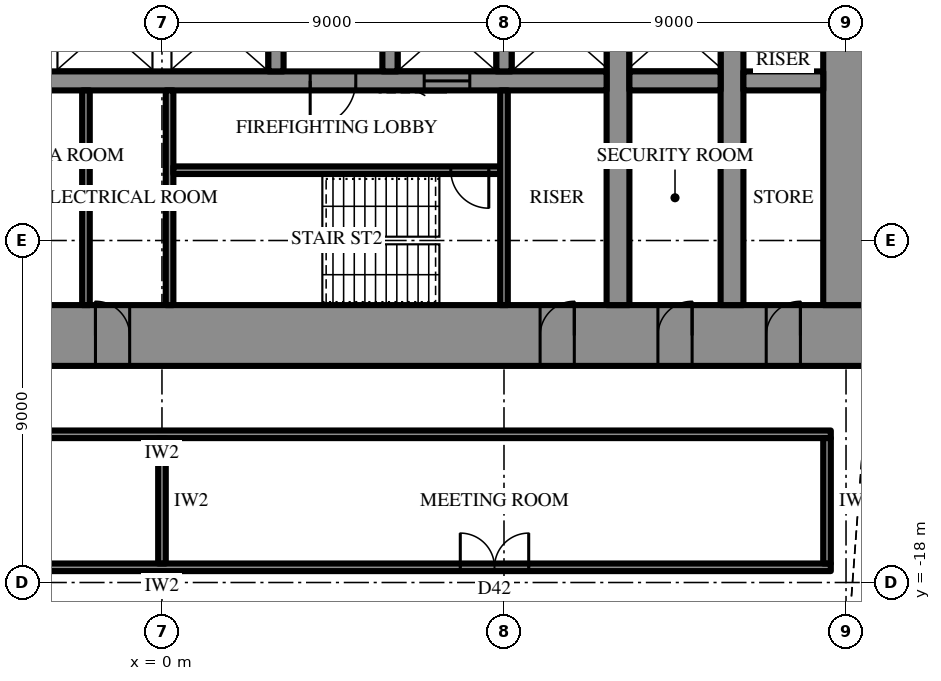
"""IFC4 building model, lengths in metres.
Left out: names, types, materials, properties, quantities, classifications, styles, units other than length and angle.
Written with IfcOpenShell. Run it as: python <this file> out.ifc"""

import sys

from ifc_helpers import new_model, si_unit, direction, frame, frame_2d, origin, place, context, subcontext, project, spatial, rectangle, extrude, element, fill, save


model = new_model("IFC4")
c1 = context("Model", 3, precision=1e-05, world=origin(), true_north=direction((0.0, 1.0)))
c2 = subcontext(c1, "Body", "Model", "MODEL_VIEW")
j1 = project(units=[si_unit("LENGTHUNIT", "METRE"), si_unit("PLANEANGLEUNIT", "RADIAN")], contexts=[c1])
p1 = place(None, origin())
s1 = spatial("IfcSite", under=j1, at=p1, CompositionType="ELEMENT")
p2 = place(p1, origin())
s2 = spatial("IfcBuilding", under=s1, at=p2, CompositionType="ELEMENT")
p3 = place(p2, frame((0.0, 0.0, 123.7)))
s3 = spatial("IfcBuildingStorey", under=s2, at=p3, CompositionType="ELEMENT", Elevation=123.7)
p4 = place(p3, frame((18.6, -11.5, 0.0), z_axis=(0.0, 0.0, 1.0), x_axis=(-1.0, 0.0, 0.0)))
e1 = element("IfcWall", 1, at=p4, inside=s3, PredefinedType="SHEAR", context=c2, shape_type="SweptSolid", body=[
    extrude(rectangle(XDim=37.2, YDim=1.6, at=frame_2d((18.6, 0.0))), origin(), (0.0, 0.0, 1.0), 4.2),
])
p5 = place(p4, frame((19.45, 0.0, 0.0)))
e2 = element("IfcOpeningElement", 2, at=p5, cuts=e1, PredefinedType="OPENING", context=c2, shape_type="SweptSolid", body=[
    extrude(rectangle(XDim=0.9, YDim=2.2, at=frame_2d((0.45, 1.1))), frame((0.0, 0.81, 0.0), z_axis=(0.0, -1.0, 0.0), x_axis=(1.0, 0.0, 0.0)), (0.0, 0.0, 1.0), 1.62),
])
p6 = place(p4, frame((22.45, 0.0, 0.0)))
e3 = element("IfcOpeningElement", 3, at=p6, cuts=e1, PredefinedType="OPENING", context=c2, shape_type="SweptSolid", body=[
    extrude(rectangle(XDim=0.9, YDim=2.2, at=frame_2d((0.45, 1.1))), frame((0.0, 0.81, 0.0), z_axis=(0.0, -1.0, 0.0), x_axis=(1.0, 0.0, 0.0)), (0.0, 0.0, 1.0), 1.62),
])
p7 = place(p4, frame((25.5, 0.0, 0.0)))
e4 = element("IfcOpeningElement", 4, at=p7, cuts=e1, PredefinedType="OPENING", context=c2, shape_type="SweptSolid", body=[
    extrude(rectangle(XDim=1.0, YDim=2.2, at=frame_2d((0.5, 1.1))), frame((0.0, 0.81, 0.0), z_axis=(0.0, -1.0, 0.0), x_axis=(1.0, 0.0, 0.0)), (0.0, 0.0, 1.0), 1.62),
])
p8 = place(p4, frame((1.8, 0.0, 0.0)))
e5 = element("IfcOpeningElement", 5, at=p8, cuts=e1, PredefinedType="OPENING", context=c2, shape_type="SweptSolid", body=[
    extrude(rectangle(XDim=0.9, YDim=2.2, at=frame_2d((0.45, 1.1))), frame((0.0, 0.81, 0.0), z_axis=(0.0, -1.0, 0.0), x_axis=(1.0, 0.0, 0.0)), (0.0, 0.0, 1.0), 1.62),
])
p9 = place(p4, frame((4.65, 0.0, 0.0)))
e6 = element("IfcOpeningElement", 6, at=p9, cuts=e1, PredefinedType="OPENING", context=c2, shape_type="SweptSolid", body=[
    extrude(rectangle(XDim=0.9, YDim=2.2, at=frame_2d((0.45, 1.1))), frame((0.0, 0.81, 0.0), z_axis=(0.0, -1.0, 0.0), x_axis=(1.0, 0.0, 0.0)), (0.0, 0.0, 1.0), 1.62),
])
p10 = place(p4, frame((7.75, 0.0, 0.0)))
e7 = element("IfcOpeningElement", 7, at=p10, cuts=e1, PredefinedType="OPENING", context=c2, shape_type="SweptSolid", body=[
    extrude(rectangle(XDim=0.9, YDim=2.2, at=frame_2d((0.45, 1.1))), frame((0.0, 0.81, 0.0), z_axis=(0.0, -1.0, 0.0), x_axis=(1.0, 0.0, 0.0)), (0.0, 0.0, 1.0), 1.62),
])
p11 = place(p4, frame((28.55, 0.0, 0.0)))
e8 = element("IfcOpeningElement", 8, at=p11, cuts=e1, PredefinedType="OPENING", context=c2, shape_type="SweptSolid", body=[
    extrude(rectangle(XDim=0.9, YDim=2.2, at=frame_2d((0.45, 1.1))), frame((0.0, 0.81, 0.0), z_axis=(0.0, -1.0, 0.0), x_axis=(1.0, 0.0, 0.0)), (0.0, 0.0, 1.0), 1.62),
])
p12 = place(p4, frame((31.65, 0.0, 0.0)))
e9 = element("IfcOpeningElement", 9, at=p12, cuts=e1, PredefinedType="OPENING", context=c2, shape_type="SweptSolid", body=[
    extrude(rectangle(XDim=0.9, YDim=2.2, at=frame_2d((0.45, 1.1))), frame((0.0, 0.81, 0.0), z_axis=(0.0, -1.0, 0.0), x_axis=(1.0, 0.0, 0.0)), (0.0, 0.0, 1.0), 1.62),
])
p13 = place(p4, frame((34.5, 0.0, 0.0)))
e10 = element("IfcOpeningElement", 10, at=p13, cuts=e1, PredefinedType="OPENING", context=c2, shape_type="SweptSolid", body=[
    extrude(rectangle(XDim=0.9, YDim=2.2, at=frame_2d((0.45, 1.1))), frame((0.0, 0.81, 0.0), z_axis=(0.0, -1.0, 0.0), x_axis=(1.0, 0.0, 0.0)), (0.0, 0.0, 1.0), 1.62),
])
p14 = place(p3, frame((18.0, -10.7, 0.0), z_axis=(0.0, 0.0, 1.0), x_axis=(0.0, 1.0, 0.0)))
e11 = element("IfcWall", 11, at=p14, inside=s3, PredefinedType="SHEAR", context=c2, shape_type="SweptSolid", body=[
    extrude(rectangle(XDim=21.4, YDim=1.2, at=frame_2d((10.7, 0.0))), origin(), (0.0, 0.0, 1.0), 4.2),
])
p15 = place(p14, frame((9.8, 0.0, 0.0)))
e12 = element("IfcOpeningElement", 12, at=p15, cuts=e11, PredefinedType="OPENING", context=c2, shape_type="SweptSolid", body=[
    extrude(rectangle(XDim=1.8, YDim=2.4, at=frame_2d((0.9, 1.2))), frame((0.0, 0.61, 0.0), z_axis=(0.0, -1.0, 0.0), x_axis=(1.0, 0.0, 0.0)), (0.0, 0.0, 1.0), 1.22),
])
p16 = place(p3, frame((12.0, -10.7, 0.0), z_axis=(0.0, 0.0, 1.0), x_axis=(0.0, 1.0, 0.0)))
e13 = element("IfcWall", 13, at=p16, inside=s3, PredefinedType="SHEAR", context=c2, shape_type="SweptSolid", body=[
    extrude(rectangle(XDim=21.4, YDim=0.6, at=frame_2d((10.7, 0.0))), origin(), (0.0, 0.0, 1.0), 4.2),
])
p17 = place(p16, frame((9.8, 0.0, 0.0)))
e14 = element("IfcOpeningElement", 14, at=p17, cuts=e13, PredefinedType="OPENING", context=c2, shape_type="SweptSolid", body=[
    extrude(rectangle(XDim=1.8, YDim=2.4, at=frame_2d((0.9, 1.2))), frame((0.0, 0.31, 0.0), z_axis=(0.0, -1.0, 0.0), x_axis=(1.0, 0.0, 0.0)), (0.0, 0.0, 1.0), 0.62),
])
p18 = place(p3, frame((15.0, -10.7, 0.0), z_axis=(0.0, 0.0, 1.0), x_axis=(0.0, 1.0, 0.0)))
e15 = element("IfcWall", 15, at=p18, inside=s3, PredefinedType="SHEAR", context=c2, shape_type="SweptSolid", body=[
    extrude(rectangle(XDim=21.4, YDim=0.6, at=frame_2d((10.7, 0.0))), origin(), (0.0, 0.0, 1.0), 4.2),
])
p19 = place(p18, frame((9.8, 0.0, 0.0)))
e16 = element("IfcOpeningElement", 16, at=p19, cuts=e15, PredefinedType="OPENING", context=c2, shape_type="SweptSolid", body=[
    extrude(rectangle(XDim=1.8, YDim=2.4, at=frame_2d((0.9, 1.2))), frame((0.0, 0.31, 0.0), z_axis=(0.0, -1.0, 0.0), x_axis=(1.0, 0.0, 0.0)), (0.0, 0.0, 1.0), 0.62),
])
p20 = place(p3, frame((17.4, -4.8, 0.0), z_axis=(0.0, 0.0, 1.0), x_axis=(-1.0, 0.0, 0.0)))
e17 = element("IfcWall", 17, at=p20, inside=s3, PredefinedType="SHEAR", context=c2, shape_type="SweptSolid", body=[
    extrude(rectangle(XDim=2.1, YDim=0.5, at=frame_2d((1.05, 0.0))), origin(), (0.0, 0.0, 1.0), 4.2),
])
p21 = place(p3, frame((14.7, -4.8, 0.0), z_axis=(0.0, 0.0, 1.0), x_axis=(-1.0, 0.0, 0.0)))
e18 = element("IfcWall", 18, at=p21, inside=s3, PredefinedType="SHEAR", context=c2, shape_type="SweptSolid", body=[
    extrude(rectangle(XDim=2.4, YDim=0.5, at=frame_2d((1.2, 0.0))), origin(), (0.0, 0.0, 1.0), 4.2),
])
p22 = place(p3, frame((11.7, -4.8, 0.0), z_axis=(0.0, 0.0, 1.0), x_axis=(-1.0, 0.0, 0.0)))
e19 = element("IfcWall", 19, at=p22, inside=s3, PredefinedType="SHEAR", context=c2, shape_type="SweptSolid", body=[
    extrude(rectangle(XDim=23.4, YDim=0.5, at=frame_2d((11.7, 0.0))), origin(), (0.0, 0.0, 1.0), 4.2),
])
p23 = place(p22, frame((6.6, 0.0, 0.0)))
e20 = element("IfcOpeningElement", 20, at=p23, cuts=e19, PredefinedType="OPENING", context=c2, shape_type="SweptSolid", body=[
    extrude(rectangle(XDim=1.2, YDim=2.2, at=frame_2d((0.6, 1.1))), frame((0.0, 0.26, 0.0), z_axis=(0.0, -1.0, 0.0), x_axis=(1.0, 0.0, 0.0)), (0.0, 0.0, 1.0), 0.52),
])
p24 = place(p22, frame((3.6, 0.0, 0.0)))
e21 = element("IfcOpeningElement", 21, at=p24, cuts=e19, PredefinedType="OPENING", context=c2, shape_type="SweptSolid", body=[
    extrude(rectangle(XDim=1.2, YDim=2.2, at=frame_2d((0.6, 1.1))), frame((0.0, 0.26, 0.0), z_axis=(0.0, -1.0, 0.0), x_axis=(1.0, 0.0, 0.0)), (0.0, 0.0, 1.0), 0.52),
])
for number, where, z_axis, x_axis in (
    (22, (9.0, -2.25, 0.0), (0.0, 0.0, 1.0), (0.0, -1.0, 0.0)),
    (23, (6.0, -2.25, 0.0), (0.0, 0.0, 1.0), (0.0, -1.0, 0.0)),
    (24, (3.0, -2.25, 0.0), (0.0, 0.0, 1.0), (0.0, -1.0, 0.0)),
):
    element("IfcWall", number, at=place(p3, frame(where, z_axis=z_axis, x_axis=x_axis)), inside=s3, PredefinedType="SHEAR", context=c2, shape_type="SweptSolid", body=[
        extrude(rectangle(XDim=2.3, YDim=0.4, at=frame_2d((1.15, 0.0))), origin(), (0.0, 0.0, 1.0), 4.2),
    ])
p25 = place(p3, frame((0.2, -5.05, 0.0), z_axis=(0.0, 0.0, 1.0), x_axis=(0.0, -1.0, 0.0)))
e25 = element("IfcWall", 25, at=p25, inside=s3, PredefinedType="SHEAR", context=c2, shape_type="SweptSolid", body=[
    extrude(rectangle(XDim=5.65, YDim=0.2, at=frame_2d((2.825, 0.0))), origin(), (0.0, 0.0, 1.0), 4.2),
])
p26 = place(p3, frame((8.9, -7.15, 0.0), z_axis=(0.0, 0.0, 1.0), x_axis=(-1.0, 0.0, 0.0)))
e26 = element("IfcWall", 26, at=p26, inside=s3, PredefinedType="SHEAR", context=c2, shape_type="SweptSolid", body=[
    extrude(rectangle(XDim=8.6, YDim=0.2, at=frame_2d((4.3, 0.0))), origin(), (0.0, 0.0, 1.0), 4.2),
])
p27 = place(p26, frame((0.3, 0.0, 0.0)))
e27 = element("IfcOpeningElement", 27, at=p27, cuts=e26, PredefinedType="OPENING", context=c2, shape_type="SweptSolid", body=[
    extrude(rectangle(XDim=1.0, YDim=2.2, at=frame_2d((0.5, 1.1))), frame((0.0, 0.11, 0.0), z_axis=(0.0, -1.0, 0.0), x_axis=(1.0, 0.0, 0.0)), (0.0, 0.0, 1.0), 0.22),
])
for number, where, z_axis, x_axis in (
    (28, (9.0, -5.05, 0.0), (0.0, 0.0, 1.0), (0.0, -1.0, 0.0)),
    (29, (-2.0, -5.05, 0.0), (0.0, 0.0, 1.0), (0.0, -1.0, 0.0)),
):
    element("IfcWall", number, at=place(p3, frame(where, z_axis=z_axis, x_axis=x_axis)), inside=s3, PredefinedType="PARTITIONING", context=c2, shape_type="SweptSolid", body=[
        extrude(rectangle(XDim=5.65, YDim=0.2, at=frame_2d((2.825, 0.0))), origin(), (0.0, 0.0, 1.0), 4.0),
    ])
p28 = place(p3, frame((17.6, -14.1, 0.0), z_axis=(0.0, 0.0, 1.0), x_axis=(-1.0, 0.0, 0.0)))
e30 = element("IfcWall", 30, at=p28, inside=s3, PredefinedType="PARTITIONING", context=c2, shape_type="SweptSolid", body=[
    extrude(rectangle(XDim=35.2, YDim=0.2, at=frame_2d((17.6, 0.0))), origin(), (0.0, 0.0, 1.0), 4.0),
])
p29 = place(p3, frame((17.6, -17.6, 0.0), z_axis=(0.0, 0.0, 1.0), x_axis=(-1.0, 0.0, 0.0)))
e31 = element("IfcWall", 31, at=p29, inside=s3, PredefinedType="PARTITIONING", context=c2, shape_type="SweptSolid", body=[
    extrude(rectangle(XDim=35.2, YDim=0.2, at=frame_2d((17.6, 0.0))), origin(), (0.0, 0.0, 1.0), 4.0),
])
p30 = place(p29, frame((7.95, 0.0, 0.0)))
e32 = element("IfcOpeningElement", 32, at=p30, cuts=e31, PredefinedType="OPENING", context=c2, shape_type="SweptSolid", body=[
    extrude(rectangle(XDim=1.8, YDim=2.4, at=frame_2d((0.9, 1.2))), frame((0.0, 0.11, 0.0), z_axis=(0.0, -1.0, 0.0), x_axis=(1.0, 0.0, 0.0)), (0.0, 0.0, 1.0), 0.22),
])
p31 = place(p29, frame((25.45, 0.0, 0.0)))
e33 = element("IfcOpeningElement", 33, at=p31, cuts=e31, PredefinedType="OPENING", context=c2, shape_type="SweptSolid", body=[
    extrude(rectangle(XDim=1.8, YDim=2.4, at=frame_2d((0.9, 1.2))), frame((0.0, 0.11, 0.0), z_axis=(0.0, -1.0, 0.0), x_axis=(1.0, 0.0, 0.0)), (0.0, 0.0, 1.0), 0.22),
])
p32 = place(p3, frame((17.5, -14.2, 0.0), z_axis=(0.0, 0.0, 1.0), x_axis=(0.0, -1.0, 0.0)))
e34 = element("IfcWall", 34, at=p32, inside=s3, PredefinedType="PARTITIONING", context=c2, shape_type="SweptSolid", body=[
    extrude(rectangle(XDim=3.3, YDim=0.2, at=frame_2d((1.65, 0.0))), origin(), (0.0, 0.0, 1.0), 4.0),
])
p33 = place(p3, frame((0.0, -14.2, 0.0), z_axis=(0.0, 0.0, 1.0), x_axis=(0.0, -1.0, 0.0)))
e35 = element("IfcWall", 35, at=p33, inside=s3, PredefinedType="PARTITIONING", context=c2, shape_type="SweptSolid", body=[
    extrude(rectangle(XDim=3.3, YDim=0.2, at=frame_2d((1.65, 0.0))), origin(), (0.0, 0.0, 1.0), 2.992),
])
p34 = place(p3, frame((17.463, -21.753, 0.0), z_axis=(0.0, 0.0, 1.0), x_axis=(0.500010972563, 0.86601906868, 0.0)))
e36 = element("IfcWall", 36, at=p34, inside=s3, PredefinedType="PARTITIONING", context=c2, shape_type="SweptSolid", body=[
    extrude(rectangle(XDim=15.211, YDim=0.2, at=frame_2d((7.605, 0.0))), origin(), (0.0, 0.0, 1.0), 4.0),
])
p35 = place(p34, frame((7.105, 0.0, 0.0)))
e37 = element("IfcOpeningElement", 37, at=p35, cuts=e36, PredefinedType="OPENING", context=c2, shape_type="SweptSolid", body=[
    extrude(rectangle(XDim=1.0, YDim=2.2, at=frame_2d((0.5, 1.1))), frame((0.0, 0.11, 0.0), z_axis=(0.0, -1.0, 0.0), x_axis=(1.0, 0.0, 0.0)), (0.0, 0.0, 1.0), 0.22),
])
p36 = place(p23, origin())
e38 = element("IfcDoor", 38, at=p36, inside=s3, OperationType="SINGLE_SWING_LEFT", PredefinedType="DOOR", context=c2, shape_type="SweptSolid", body=[
    extrude(rectangle(XDim=1.2, YDim=2.2, at=frame_2d((0.6, 1.1))), frame((0.0, 0.025, 0.0), z_axis=(0.0, -1.0, 0.0), x_axis=(1.0, 0.0, 0.0)), (0.0, 0.0, 1.0), 0.05),
])
fill(e20, e38)
p37 = place(p27, origin())
e39 = element("IfcDoor", 39, at=p37, inside=s3, OperationType="SINGLE_SWING_RIGHT", PredefinedType="DOOR", context=c2, shape_type="SweptSolid", body=[
    extrude(rectangle(XDim=1.0, YDim=2.2, at=frame_2d((0.5, 1.1))), frame((0.0, 0.025, 0.0), z_axis=(0.0, -1.0, 0.0), x_axis=(1.0, 0.0, 0.0)), (0.0, 0.0, 1.0), 0.05),
])
fill(e27, e39)
p38 = place(p5, frame((0.9, 0.0, 0.0), z_axis=(0.0, 0.0, 1.0), x_axis=(-1.0, 0.0, 0.0)))
e40 = element("IfcDoor", 40, at=p38, inside=s3, OperationType="SINGLE_SWING_RIGHT", PredefinedType="DOOR", context=c2, shape_type="SweptSolid", body=[
    extrude(rectangle(XDim=0.9, YDim=2.2, at=frame_2d((0.45, 1.1))), frame((0.0, 0.025, 0.0), z_axis=(0.0, -1.0, 0.0), x_axis=(1.0, 0.0, 0.0)), (0.0, 0.0, 1.0), 0.05),
])
fill(e2, e40)
p39 = place(p8, frame((0.9, 0.0, 0.0), z_axis=(0.0, 0.0, 1.0), x_axis=(-1.0, 0.0, 0.0)))
e41 = element("IfcDoor", 41, at=p39, inside=s3, OperationType="SINGLE_SWING_LEFT", PredefinedType="DOOR", context=c2, shape_type="SweptSolid", body=[
    extrude(rectangle(XDim=0.9, YDim=2.2, at=frame_2d((0.45, 1.1))), frame((0.0, 0.025, 0.0), z_axis=(0.0, -1.0, 0.0), x_axis=(1.0, 0.0, 0.0)), (0.0, 0.0, 1.0), 0.05),
])
fill(e5, e41)
p40 = place(p9, frame((0.9, 0.0, 0.0), z_axis=(0.0, 0.0, 1.0), x_axis=(-1.0, 0.0, 0.0)))
e42 = element("IfcDoor", 42, at=p40, inside=s3, OperationType="SINGLE_SWING_LEFT", PredefinedType="DOOR", context=c2, shape_type="SweptSolid", body=[
    extrude(rectangle(XDim=0.9, YDim=2.2, at=frame_2d((0.45, 1.1))), frame((0.0, 0.025, 0.0), z_axis=(0.0, -1.0, 0.0), x_axis=(1.0, 0.0, 0.0)), (0.0, 0.0, 1.0), 0.05),
])
fill(e6, e42)
p41 = place(p10, frame((0.9, 0.0, 0.0), z_axis=(0.0, 0.0, 1.0), x_axis=(-1.0, 0.0, 0.0)))
e43 = element("IfcDoor", 43, at=p41, inside=s3, OperationType="SINGLE_SWING_LEFT", PredefinedType="DOOR", context=c2, shape_type="SweptSolid", body=[
    extrude(rectangle(XDim=0.9, YDim=2.2, at=frame_2d((0.45, 1.1))), frame((0.0, 0.025, 0.0), z_axis=(0.0, -1.0, 0.0), x_axis=(1.0, 0.0, 0.0)), (0.0, 0.0, 1.0), 0.05),
])
fill(e7, e43)
p42 = place(p24, origin())
e44 = element("IfcDoor", 44, at=p42, inside=s3, OperationType="SLIDING_TO_LEFT", PredefinedType="DOOR", context=c2, shape_type="SweptSolid", body=[
    extrude(rectangle(XDim=1.2, YDim=2.2, at=frame_2d((0.6, 1.1))), frame((0.0, 0.025, 0.0), z_axis=(0.0, -1.0, 0.0), x_axis=(1.0, 0.0, 0.0)), (0.0, 0.0, 1.0), 0.05),
])
fill(e21, e44)
p43 = place(p30, frame((1.8, 0.0, 0.0), z_axis=(0.0, 0.0, 1.0), x_axis=(-1.0, 0.0, 0.0)))
e45 = element("IfcDoor", 45, at=p43, inside=s3, OperationType="DOUBLE_DOOR_SINGLE_SWING", PredefinedType="DOOR", context=c2, shape_type="SweptSolid", body=[
    extrude(rectangle(XDim=1.8, YDim=2.4, at=frame_2d((0.9, 1.2))), frame((0.0, 0.025, 0.0), z_axis=(0.0, -1.0, 0.0), x_axis=(1.0, 0.0, 0.0)), (0.0, 0.0, 1.0), 0.05),
])
fill(e32, e45)
save(model, sys.argv[1])
